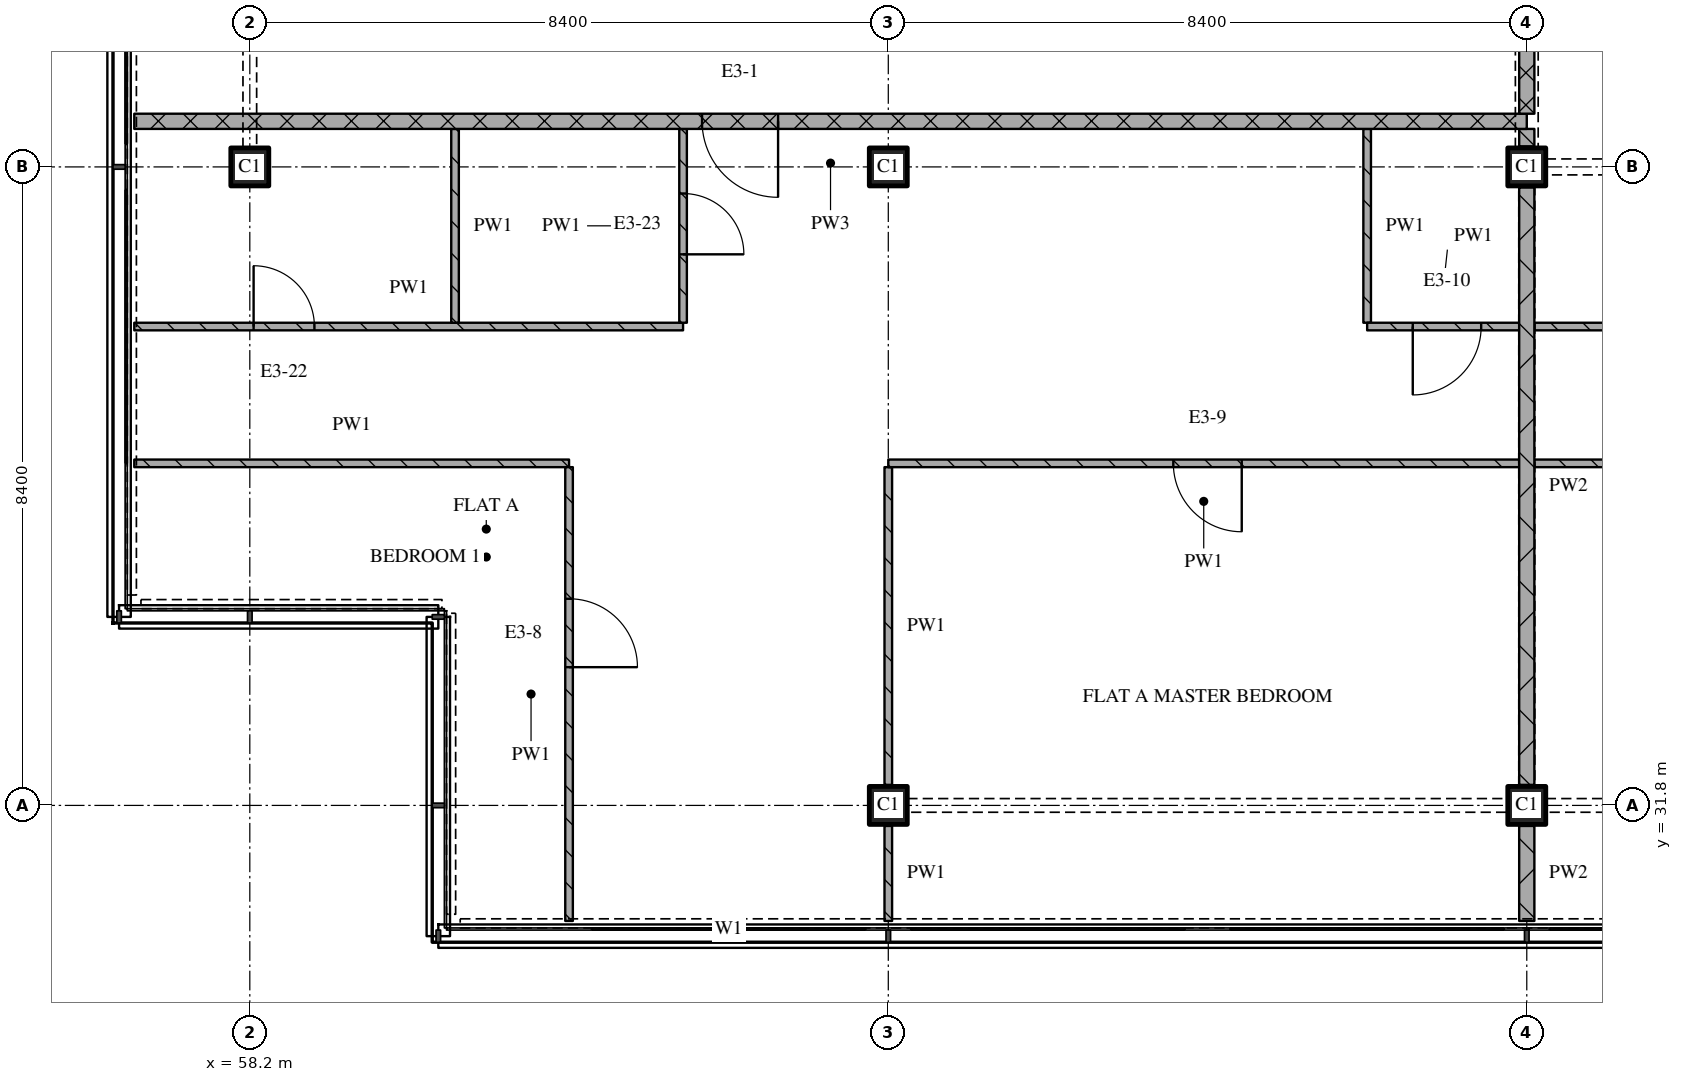
"""IFC4 building model, lengths in metres.
Left out: names, types, materials, properties, quantities, classifications, styles, units other than length and angle.
Written with IfcOpenShell. Run it as: python <this file> out.ifc"""

import sys

from ifc_helpers import new_model, si_unit, direction, frame, frame_2d, origin, origin_2d, place, context, subcontext, project, spatial, rectangle, extrude, element, fill, save


model = new_model("IFC4")
c1 = context("Model", 3, precision=1e-05, world=origin(), true_north=direction((0.0, 1.0)))
c2 = subcontext(c1, "Body", "Model", "MODEL_VIEW")
j1 = project(units=[si_unit("LENGTHUNIT", "METRE"), si_unit("PLANEANGLEUNIT", "RADIAN")], contexts=[c1])
p1 = place(None, origin())
s1 = spatial("IfcSite", under=j1, at=p1, CompositionType="ELEMENT")
p2 = place(p1, origin())
s2 = spatial("IfcBuilding", under=s1, at=p2, CompositionType="ELEMENT")
p3 = place(p2, frame((0.0, 0.0, 277.95)))
s3 = spatial("IfcBuildingStorey", under=s2, at=p3, CompositionType="ELEMENT", Elevation=277.95)
for number, where, z_axis, x_axis in (
    (1, (58.2, 40.2, 0.0), (0.0, 0.0, 1.0), (1.0, 0.0, 0.0)),
    (2, (66.6, 31.8, 0.0), (0.0, 0.0, 1.0), (1.0, 0.0, 0.0)),
    (3, (66.6, 40.2, 0.0), (0.0, 0.0, 1.0), (1.0, 0.0, 0.0)),
    (4, (75.0, 31.8, 0.0), (0.0, 0.0, 1.0), (1.0, 0.0, 0.0)),
    (5, (75.0, 40.2, 0.0), (0.0, 0.0, 1.0), (1.0, 0.0, 0.0)),
):
    element("IfcColumn", number, at=place(p3, frame(where, z_axis=z_axis, x_axis=x_axis)), inside=s3, PredefinedType="COLUMN", context=c2, shape_type="SweptSolid", body=[
        extrude(rectangle(XDim=0.5, YDim=0.5, at=origin_2d()), origin(), (0.0, 0.0, 1.0), 3.6),
    ])
p4 = place(p3, frame((56.68, 36.3, 0.0), z_axis=(0.0, 0.0, 1.0), x_axis=(1.0, 0.0, 0.0)))
e6 = element("IfcWall", 6, at=p4, inside=s3, PredefinedType="PARTITIONING", context=c2, shape_type="SweptSolid", body=[
    extrude(rectangle(XDim=5.72, YDim=0.1, at=frame_2d((2.86, 0.0))), origin(), (0.0, 0.0, 1.0), 3.32),
])
p5 = place(p3, frame((56.68, 38.1, 0.0), z_axis=(0.0, 0.0, 1.0), x_axis=(1.0, 0.0, 0.0)))
e7 = element("IfcWall", 7, at=p5, inside=s3, PredefinedType="PARTITIONING", context=c2, shape_type="SweptSolid", body=[
    extrude(rectangle(XDim=7.22, YDim=0.1, at=frame_2d((3.61, 0.0))), origin(), (0.0, 0.0, 1.0), 3.32),
])
p6 = place(p5, frame((1.57, 0.0, 0.0)))
e8 = element("IfcOpeningElement", 8, at=p6, cuts=e7, PredefinedType="OPENING", context=c2, shape_type="SweptSolid", body=[
    extrude(rectangle(XDim=0.8, YDim=2.1, at=frame_2d((0.4, 1.05))), frame((0.0, 0.06, 0.0), z_axis=(0.0, -1.0, 0.0), x_axis=(1.0, 0.0, 0.0)), (0.0, 0.0, 1.0), 0.12),
])
p7 = place(p3, frame((75.0, 40.8, 0.0), z_axis=(0.0, 0.0, 1.0), x_axis=(-1.0, 0.0, 0.0)))
e9 = element("IfcWall", 9, at=p7, inside=s3, PredefinedType="PARTITIONING", context=c2, shape_type="SweptSolid", body=[
    extrude(rectangle(XDim=18.32, YDim=0.2, at=frame_2d((9.16, 0.0))), origin(), (0.0, 0.0, 1.0), 3.32),
])
p8 = place(p7, frame((9.85, 0.0, 0.0)))
e10 = element("IfcOpeningElement", 10, at=p8, cuts=e9, PredefinedType="OPENING", context=c2, shape_type="SweptSolid", body=[
    extrude(rectangle(XDim=1.0, YDim=2.1, at=frame_2d((0.5, 1.05))), frame((0.0, 0.11, 0.0), z_axis=(0.0, -1.0, 0.0), x_axis=(1.0, 0.0, 0.0)), (0.0, 0.0, 1.0), 0.22),
])
p9 = place(p3, frame((60.9, 40.7, 0.0), z_axis=(0.0, 0.0, 1.0), x_axis=(0.0, -1.0, 0.0)))
e11 = element("IfcWall", 11, at=p9, inside=s3, PredefinedType="PARTITIONING", context=c2, shape_type="SweptSolid", body=[
    extrude(rectangle(XDim=2.55, YDim=0.1, at=frame_2d((1.275, 0.0))), origin(), (0.0, 0.0, 1.0), 3.32),
])
p10 = place(p3, frame((62.4, 30.28, 0.0), z_axis=(0.0, 0.0, 1.0), x_axis=(0.0, 1.0, 0.0)))
e12 = element("IfcWall", 12, at=p10, inside=s3, PredefinedType="PARTITIONING", context=c2, shape_type="SweptSolid", body=[
    extrude(rectangle(XDim=5.97, YDim=0.1, at=frame_2d((2.985, 0.0))), origin(), (0.0, 0.0, 1.0), 3.32),
])
p11 = place(p10, frame((3.339, 0.0, 0.0)))
e13 = element("IfcOpeningElement", 13, at=p11, cuts=e12, PredefinedType="OPENING", context=c2, shape_type="SweptSolid", body=[
    extrude(rectangle(XDim=0.9, YDim=2.1, at=frame_2d((0.45, 1.05))), frame((0.0, 0.06, 0.0), z_axis=(0.0, -1.0, 0.0), x_axis=(1.0, 0.0, 0.0)), (0.0, 0.0, 1.0), 0.12),
])
p12 = place(p3, frame((63.9, 38.15, 0.0), z_axis=(0.0, 0.0, 1.0), x_axis=(0.0, 1.0, 0.0)))
e14 = element("IfcWall", 14, at=p12, inside=s3, PredefinedType="PARTITIONING", context=c2, shape_type="SweptSolid", body=[
    extrude(rectangle(XDim=2.55, YDim=0.1, at=frame_2d((1.275, 0.0))), origin(), (0.0, 0.0, 1.0), 3.32),
])
p13 = place(p12, frame((0.9, 0.0, 0.0)))
e15 = element("IfcOpeningElement", 15, at=p13, cuts=e14, PredefinedType="OPENING", context=c2, shape_type="SweptSolid", body=[
    extrude(rectangle(XDim=0.8, YDim=2.1, at=frame_2d((0.4, 1.05))), frame((0.0, 0.06, 0.0), z_axis=(0.0, -1.0, 0.0), x_axis=(1.0, 0.0, 0.0)), (0.0, 0.0, 1.0), 0.12),
])
p14 = place(p3, frame((66.6, 31.53, 0.0), z_axis=(0.0, 0.0, 1.0), x_axis=(0.0, -1.0, 0.0)))
e16 = element("IfcWall", 16, at=p14, inside=s3, PredefinedType="PARTITIONING", context=c2, shape_type="SweptSolid", body=[
    extrude(rectangle(XDim=1.25, YDim=0.1, at=frame_2d((0.625, 0.0))), origin(), (0.0, 0.0, 1.0), 3.32),
])
p15 = place(p3, frame((66.6, 36.25, 0.0), z_axis=(0.0, 0.0, 1.0), x_axis=(0.0, -1.0, 0.0)))
e17 = element("IfcWall", 17, at=p15, inside=s3, PredefinedType="PARTITIONING", context=c2, shape_type="SweptSolid", body=[
    extrude(rectangle(XDim=4.18, YDim=0.1, at=frame_2d((2.09, 0.0))), origin(), (0.0, 0.0, 1.0), 3.32),
])
p16 = place(p3, frame((72.9, 40.7, 0.0), z_axis=(0.0, 0.0, 1.0), x_axis=(0.0, -1.0, 0.0)))
e18 = element("IfcWall", 18, at=p16, inside=s3, PredefinedType="PARTITIONING", context=c2, shape_type="SweptSolid", body=[
    extrude(rectangle(XDim=2.55, YDim=0.1, at=frame_2d((1.275, 0.0))), origin(), (0.0, 0.0, 1.0), 3.32),
])
p17 = place(p3, frame((75.0, 43.1, 0.0), z_axis=(0.0, 0.0, 1.0), x_axis=(0.0, -1.0, 0.0)))
e19 = element("IfcWall", 19, at=p17, inside=s3, PredefinedType="PARTITIONING", context=c2, shape_type="SweptSolid", body=[
    extrude(rectangle(XDim=2.2, YDim=0.2, at=frame_2d((1.1, 0.0))), origin(), (0.0, 0.0, 1.0), 2.53),
])
p18 = place(p3, frame((75.0, 31.53, 0.0), z_axis=(0.0, 0.0, 1.0), x_axis=(0.0, -1.0, 0.0)))
e20 = element("IfcWall", 20, at=p18, inside=s3, PredefinedType="PARTITIONING", context=c2, shape_type="SweptSolid", body=[
    extrude(rectangle(XDim=1.25, YDim=0.2, at=frame_2d((0.625, 0.0))), origin(), (0.0, 0.0, 1.0), 3.32),
])
p19 = place(p3, frame((75.0, 39.93, 0.0), z_axis=(0.0, 0.0, 1.0), x_axis=(0.0, -1.0, 0.0)))
e21 = element("IfcWall", 21, at=p19, inside=s3, PredefinedType="PARTITIONING", context=c2, shape_type="SweptSolid", body=[
    extrude(rectangle(XDim=7.86, YDim=0.2, at=frame_2d((3.93, 0.0))), origin(), (0.0, 0.0, 1.0), 2.77),
])
p20 = place(p3, frame((75.0, 40.7, 0.0), z_axis=(0.0, 0.0, 1.0), x_axis=(0.0, -1.0, 0.0)))
e22 = element("IfcWall", 22, at=p20, inside=s3, PredefinedType="PARTITIONING", context=c2, shape_type="SweptSolid", body=[
    extrude(rectangle(XDim=0.23, YDim=0.2, at=frame_2d((0.115, 0.0))), origin(), (0.0, 0.0, 1.0), 3.32),
])
p21 = place(p3, frame((74.9, 36.3, 0.0), z_axis=(0.0, 0.0, 1.0), x_axis=(-1.0, 0.0, 0.0)))
e23 = element("IfcWall", 23, at=p21, inside=s3, PredefinedType="PARTITIONING", context=c2, shape_type="SweptSolid", body=[
    extrude(rectangle(XDim=8.3, YDim=0.1, at=frame_2d((4.15, 0.0))), origin(), (0.0, 0.0, 1.0), 3.32),
])
p22 = place(p21, frame((3.65, 0.0, 0.0)))
e24 = element("IfcOpeningElement", 24, at=p22, cuts=e23, PredefinedType="OPENING", context=c2, shape_type="SweptSolid", body=[
    extrude(rectangle(XDim=0.9, YDim=2.1, at=frame_2d((0.45, 1.05))), frame((0.0, 0.06, 0.0), z_axis=(0.0, -1.0, 0.0), x_axis=(1.0, 0.0, 0.0)), (0.0, 0.0, 1.0), 0.12),
])
p23 = place(p3, frame((75.1, 36.3, 0.0), z_axis=(0.0, 0.0, 1.0), x_axis=(1.0, 0.0, 0.0)))
e25 = element("IfcWall", 25, at=p23, inside=s3, PredefinedType="PARTITIONING", context=c2, shape_type="SweptSolid", body=[
    extrude(rectangle(XDim=8.3, YDim=0.1, at=frame_2d((4.15, 0.0))), origin(), (0.0, 0.0, 1.0), 3.32),
])
p24 = place(p3, frame((72.9, 38.1, 0.0), z_axis=(0.0, 0.0, 1.0), x_axis=(1.0, 0.0, 0.0)))
e26 = element("IfcWall", 26, at=p24, inside=s3, PredefinedType="PARTITIONING", context=c2, shape_type="SweptSolid", body=[
    extrude(rectangle(XDim=2.0, YDim=0.1, at=frame_2d((1.0, 0.0))), origin(), (0.0, 0.0, 1.0), 3.32),
])
p25 = place(p24, frame((0.6, 0.0, 0.0)))
e27 = element("IfcOpeningElement", 27, at=p25, cuts=e26, PredefinedType="OPENING", context=c2, shape_type="SweptSolid", body=[
    extrude(rectangle(XDim=0.9, YDim=2.1, at=frame_2d((0.45, 1.05))), frame((0.0, 0.06, 0.0), z_axis=(0.0, -1.0, 0.0), x_axis=(1.0, 0.0, 0.0)), (0.0, 0.0, 1.0), 0.12),
])
p26 = place(p3, frame((75.1, 38.1, 0.0), z_axis=(0.0, 0.0, 1.0), x_axis=(1.0, 0.0, 0.0)))
e28 = element("IfcWall", 28, at=p26, inside=s3, PredefinedType="PARTITIONING", context=c2, shape_type="SweptSolid", body=[
    extrude(rectangle(XDim=6.5, YDim=0.1, at=frame_2d((3.25, 0.0))), origin(), (0.0, 0.0, 1.0), 3.32),
])
p27 = place(p26, frame((1.75, 0.0, 0.0)))
e29 = element("IfcOpeningElement", 29, at=p27, cuts=e28, PredefinedType="OPENING", context=c2, shape_type="SweptSolid", body=[
    extrude(rectangle(XDim=0.8, YDim=2.1, at=frame_2d((0.4, 1.05))), frame((0.0, 0.06, 0.0), z_axis=(0.0, -1.0, 0.0), x_axis=(1.0, 0.0, 0.0)), (0.0, 0.0, 1.0), 0.12),
])
p28 = place(p6, origin())
e30 = element("IfcDoor", 30, at=p28, inside=s3, OperationType="SINGLE_SWING_LEFT", PredefinedType="DOOR", context=c2, shape_type="SweptSolid", body=[
    extrude(rectangle(XDim=0.8, YDim=2.1, at=frame_2d((0.4, 1.05))), frame((0.0, 0.025, 0.0), z_axis=(0.0, -1.0, 0.0), x_axis=(1.0, 0.0, 0.0)), (0.0, 0.0, 1.0), 0.05),
])
fill(e8, e30)
p29 = place(p8, origin())
e31 = element("IfcDoor", 31, at=p29, inside=s3, OperationType="SINGLE_SWING_LEFT", PredefinedType="DOOR", context=c2, shape_type="SweptSolid", body=[
    extrude(rectangle(XDim=1.0, YDim=2.1, at=frame_2d((0.5, 1.05))), frame((0.0, 0.025, 0.0), z_axis=(0.0, -1.0, 0.0), x_axis=(1.0, 0.0, 0.0)), (0.0, 0.0, 1.0), 0.05),
])
fill(e10, e31)
p30 = place(p11, origin())
e32 = element("IfcDoor", 32, at=p30, inside=s3, OperationType="SINGLE_SWING_RIGHT", PredefinedType="DOOR", context=c2, shape_type="SweptSolid", body=[
    extrude(rectangle(XDim=0.9, YDim=2.1, at=frame_2d((0.45, 1.05))), frame((0.0, 0.025, 0.0), z_axis=(0.0, -1.0, 0.0), x_axis=(1.0, 0.0, 0.0)), (0.0, 0.0, 1.0), 0.05),
])
fill(e13, e32)
p31 = place(p13, origin())
e33 = element("IfcDoor", 33, at=p31, inside=s3, OperationType="SINGLE_SWING_RIGHT", PredefinedType="DOOR", context=c2, shape_type="SweptSolid", body=[
    extrude(rectangle(XDim=0.8, YDim=2.1, at=frame_2d((0.4, 1.05))), frame((0.0, 0.025, 0.0), z_axis=(0.0, -1.0, 0.0), x_axis=(1.0, 0.0, 0.0)), (0.0, 0.0, 1.0), 0.05),
])
fill(e15, e33)
p32 = place(p22, origin())
e34 = element("IfcDoor", 34, at=p32, inside=s3, OperationType="SINGLE_SWING_LEFT", PredefinedType="DOOR", context=c2, shape_type="SweptSolid", body=[
    extrude(rectangle(XDim=0.9, YDim=2.1, at=frame_2d((0.45, 1.05))), frame((0.0, 0.025, 0.0), z_axis=(0.0, -1.0, 0.0), x_axis=(1.0, 0.0, 0.0)), (0.0, 0.0, 1.0), 0.05),
])
fill(e24, e34)
p33 = place(p25, origin())
e35 = element("IfcDoor", 35, at=p33, inside=s3, OperationType="SINGLE_SWING_RIGHT", PredefinedType="DOOR", context=c2, shape_type="SweptSolid", body=[
    extrude(rectangle(XDim=0.9, YDim=2.1, at=frame_2d((0.45, 1.05))), frame((0.0, 0.025, 0.0), z_axis=(0.0, -1.0, 0.0), x_axis=(1.0, 0.0, 0.0)), (0.0, 0.0, 1.0), 0.05),
])
fill(e27, e35)
save(model, sys.argv[1])
